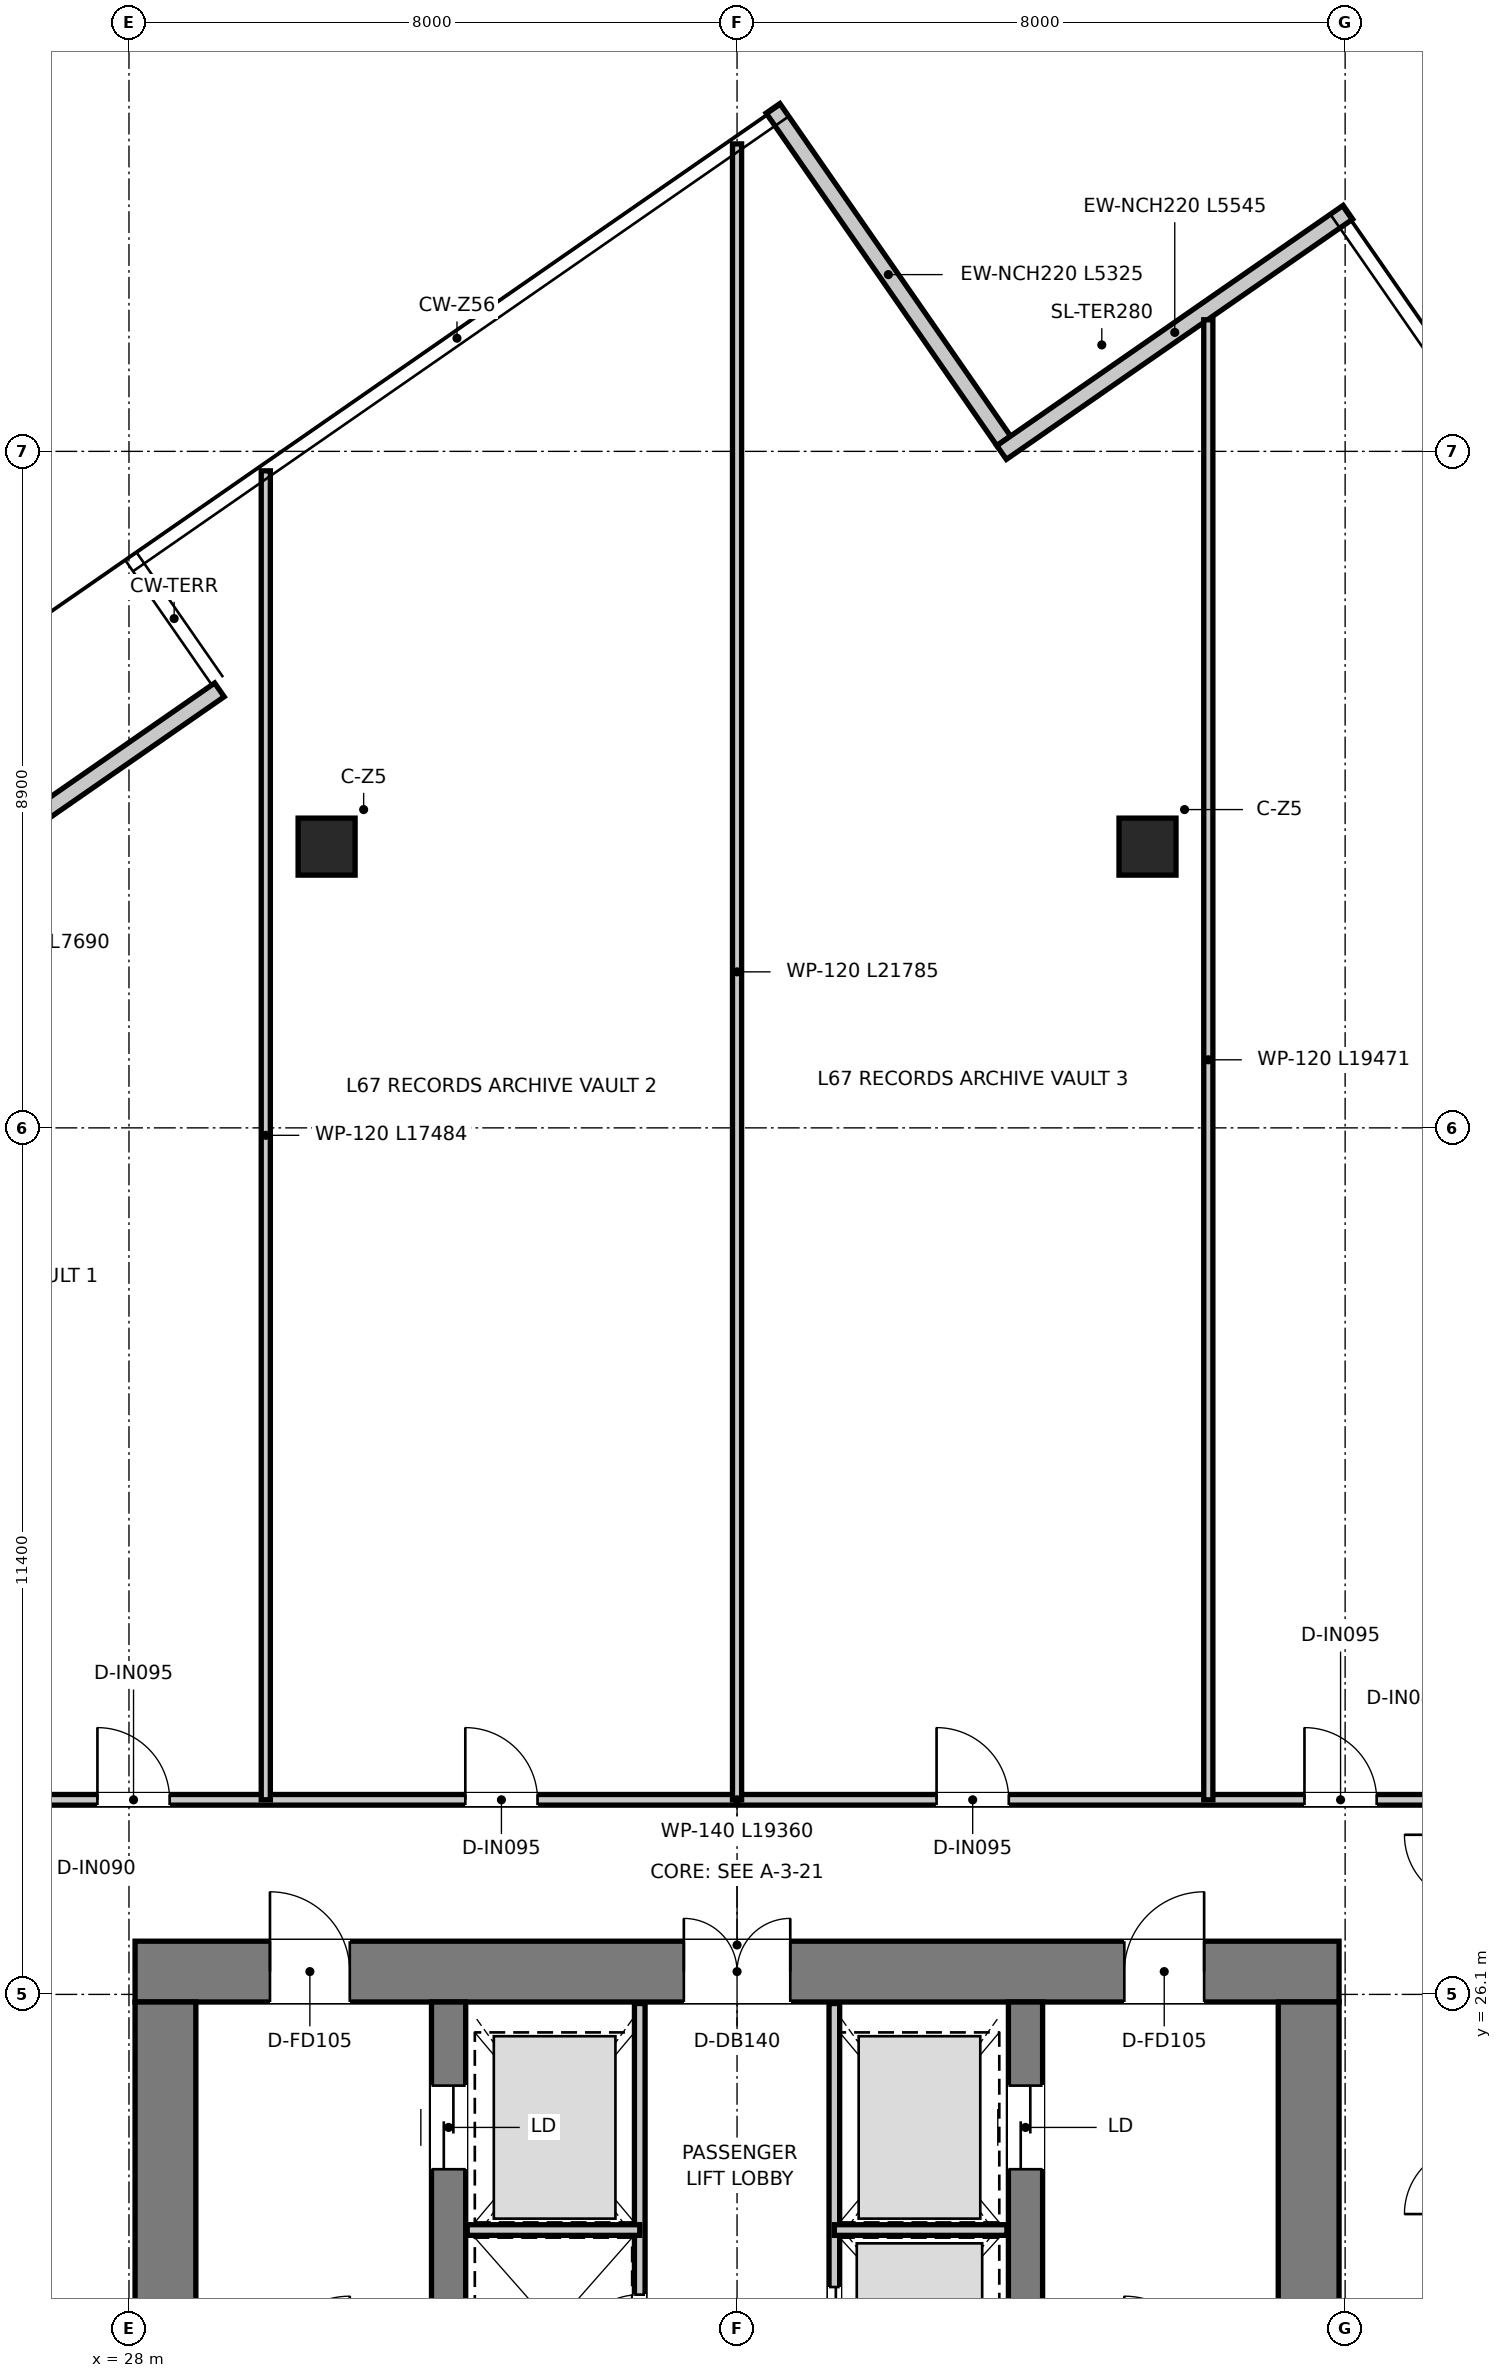
"""IFC4 building model, lengths in metres.
Left out: names, types, materials, properties, quantities, classifications, styles, units other than length and angle.
Written with IfcOpenShell. Run it as: python <this file> out.ifc"""

import sys

from ifc_helpers import new_model, si_unit, direction, frame, frame_2d, origin, origin_2d, place, context, subcontext, project, spatial, rectangle, extrude, source, transform, mapped, element, fill, save


model = new_model("IFC4")
c1 = context("Model", 3, precision=1e-05, world=origin(), true_north=direction((0.0, 1.0)))
c2 = subcontext(c1, "Body", "Model", "MODEL_VIEW")
j1 = project(units=[si_unit("LENGTHUNIT", "METRE"), si_unit("PLANEANGLEUNIT", "RADIAN")], contexts=[c1])
p1 = place(None, origin())
s1 = spatial("IfcSite", under=j1, at=p1, CompositionType="ELEMENT")
p2 = place(p1, origin())
s2 = spatial("IfcBuilding", under=s1, at=p2, CompositionType="ELEMENT")
p3 = place(p2, frame((0.0, 0.0, 275.3)))
s3 = spatial("IfcBuildingStorey", under=s2, at=p3, CompositionType="ELEMENT", Elevation=275.3)
p4 = place(p3, frame((28.08, 26.4, 0.0), z_axis=(0.0, 0.0, 1.0), x_axis=(1.0, 0.0, 0.0)))
e1 = element("IfcWall", 1, at=p4, inside=s3, PredefinedType="SHEAR", context=c2, shape_type="SweptSolid", body=[
    extrude(rectangle(XDim=15.84, YDim=0.8, at=frame_2d((7.92, 0.0))), origin(), (0.0, 0.0, 1.0), 3.95),
])
p5 = place(p4, frame((7.22, 0.0, 0.0)))
e2 = element("IfcOpeningElement", 2, at=p5, cuts=e1, PredefinedType="OPENING", context=c2, shape_type="SweptSolid", body=[
    extrude(rectangle(XDim=1.4, YDim=2.2, at=frame_2d((0.7, 1.1))), frame((0.0, 0.41, 0.0), z_axis=(0.0, -1.0, 0.0), x_axis=(1.0, 0.0, 0.0)), (0.0, 0.0, 1.0), 0.82),
])
p6 = place(p4, frame((1.775, 0.0, 0.0)))
e3 = element("IfcOpeningElement", 3, at=p6, cuts=e1, PredefinedType="OPENING", context=c2, shape_type="SweptSolid", body=[
    extrude(rectangle(XDim=1.05, YDim=2.1, at=frame_2d((0.525, 1.05))), frame((0.0, 0.41, 0.0), z_axis=(0.0, -1.0, 0.0), x_axis=(1.0, 0.0, 0.0)), (0.0, 0.0, 1.0), 0.82),
])
p7 = place(p4, frame((13.015, 0.0, 0.0)))
e4 = element("IfcOpeningElement", 4, at=p7, cuts=e1, PredefinedType="OPENING", context=c2, shape_type="SweptSolid", body=[
    extrude(rectangle(XDim=1.05, YDim=2.1, at=frame_2d((0.525, 1.05))), frame((0.0, 0.41, 0.0), z_axis=(0.0, -1.0, 0.0), x_axis=(1.0, 0.0, 0.0)), (0.0, 0.0, 1.0), 0.82),
])
for number, where, z_axis, x_axis in (
    (5, (28.48, 11.3, 0.0), (0.0, 0.0, 1.0), (0.0, 1.0, 0.0)),
    (6, (43.52, 11.3, 0.0), (0.0, 0.0, 1.0), (0.0, 1.0, 0.0)),
):
    element("IfcWall", number, at=place(p3, frame(where, z_axis=z_axis, x_axis=x_axis)), inside=s3, PredefinedType="SHEAR", context=c2, shape_type="SweptSolid", body=[
        extrude(rectangle(XDim=14.7, YDim=0.8, at=frame_2d((7.35, 0.0))), origin(), (0.0, 0.0, 1.0), 3.95),
    ])
p8 = place(p3, frame((32.205, 13.22, 0.0), z_axis=(0.0, 0.0, 1.0), x_axis=(0.0, 1.0, 0.0)))
e7 = element("IfcWall", 7, at=p8, inside=s3, PredefinedType="SHEAR", context=c2, shape_type="SweptSolid", body=[
    extrude(rectangle(XDim=12.78, YDim=0.45, at=frame_2d((6.39, 0.0))), origin(), (0.0, 0.0, 1.0), 3.95),
])
p9 = place(p8, frame((10.58, 0.0, 0.0)))
e8 = element("IfcOpeningElement", 8, at=p9, cuts=e7, PredefinedType="OPENING", context=c2, shape_type="SweptSolid", body=[
    extrude(rectangle(XDim=1.1, YDim=2.15, at=frame_2d((0.55, 1.075))), frame((0.0, 0.235, 0.0), z_axis=(0.0, -1.0, 0.0), x_axis=(1.0, 0.0, 0.0)), (0.0, 0.0, 1.0), 0.47),
])
p10 = place(p3, frame((39.795, 13.22, 0.0), z_axis=(0.0, 0.0, 1.0), x_axis=(0.0, 1.0, 0.0)))
e9 = element("IfcWall", 9, at=p10, inside=s3, PredefinedType="SHEAR", context=c2, shape_type="SweptSolid", body=[
    extrude(rectangle(XDim=12.78, YDim=0.45, at=frame_2d((6.39, 0.0))), origin(), (0.0, 0.0, 1.0), 3.95),
])
p11 = place(p10, frame((10.58, 0.0, 0.0)))
e10 = element("IfcOpeningElement", 10, at=p11, cuts=e9, PredefinedType="OPENING", context=c2, shape_type="SweptSolid", body=[
    extrude(rectangle(XDim=1.1, YDim=2.15, at=frame_2d((0.55, 1.075))), frame((0.0, 0.235, 0.0), z_axis=(0.0, -1.0, 0.0), x_axis=(1.0, 0.0, 0.0)), (0.0, 0.0, 1.0), 0.47),
])
m1 = source(origin(), c2, "Body", "SweptSolid", [
    extrude(rectangle(XDim=0.75, YDim=0.75, at=origin_2d()), origin(), (0.0, 0.0, 1.0), 3.95),
])
for number, where, z_axis, x_axis in (
    (11, (30.6, 41.2, 0.0), (0.0, 0.0, 1.0), (1.0, 0.0, 0.0)),
    (12, (41.4, 41.2, 0.0), (0.0, 0.0, 1.0), (1.0, 0.0, 0.0)),
):
    element("IfcColumn", number, at=place(p3, frame(where, z_axis=z_axis, x_axis=x_axis)), inside=s3, PredefinedType="COLUMN", context=c2, shape_type="MappedRepresentation", body=[
        mapped(m1, transform((0.0, 0.0, 0.0), x_axis=(1.0, 0.0, 0.0), y_axis=(0.0, 1.0, 0.0), z_axis=(0.0, 0.0, 1.0), scale=1.0)),
    ])
p12 = place(p3, frame((39.508, 46.538, 0.0), z_axis=(0.0, 0.0, 1.0), x_axis=(-0.570020283612, 0.821630620334, 0.0)))
e13 = element("IfcWall", 13, at=p12, inside=s3, PredefinedType="ELEMENTEDWALL", context=c2, shape_type="SweptSolid", body=[
    extrude(rectangle(XDim=5.325, YDim=0.22, at=frame_2d((2.663, 0.0))), origin(), (0.0, 0.0, 1.0), 3.67),
])
p13 = place(p3, frame((22.872, 38.879, 0.0), z_axis=(0.0, 0.0, 1.0), x_axis=(0.821640913491, 0.570005446709, 0.0)))
e14 = element("IfcWall", 14, at=p13, inside=s3, PredefinedType="ELEMENTEDWALL", context=c2, shape_type="SweptSolid", body=[
    extrude(rectangle(XDim=7.69, YDim=0.22, at=frame_2d((3.845, 0.0))), origin(), (0.0, 0.0, 1.0), 3.67),
])
p14 = place(p13, frame((3.857, 0.0, 0.0)))
e15 = element("IfcOpeningElement", 15, at=p14, cuts=e14, PredefinedType="OPENING", context=c2, shape_type="SweptSolid", body=[
    extrude(rectangle(XDim=0.95, YDim=2.1, at=frame_2d((0.475, 1.05))), frame((0.0, 0.12, 0.0), z_axis=(0.0, -1.0, 0.0), x_axis=(1.0, 0.0, 0.0)), (0.0, 0.0, 1.0), 0.24),
])
p15 = place(p3, frame((44.037, 49.545, 0.0), z_axis=(0.0, 0.0, 1.0), x_axis=(-0.821652918874, -0.569988141022, 0.0)))
e16 = element("IfcWall", 16, at=p15, inside=s3, PredefinedType="ELEMENTEDWALL", context=c2, shape_type="SweptSolid", body=[
    extrude(rectangle(XDim=5.545, YDim=0.22, at=frame_2d((2.772, 0.0))), origin(), (0.0, 0.0, 1.0), 3.67),
])
p16 = place(p3, frame((34.72, 20.2, 0.0), z_axis=(0.0, 0.0, 1.0), x_axis=(0.0, 1.0, 0.0)))
e17 = element("IfcWall", 17, at=p16, inside=s3, PredefinedType="PARTITIONING", context=c2, shape_type="SweptSolid", body=[
    extrude(rectangle(XDim=5.78, YDim=0.14, at=frame_2d((2.89, 0.0))), origin(), (0.0, 0.0, 1.0), 2.82),
])
p17 = place(p16, frame((1.05, 0.0, 0.0)))
e18 = element("IfcOpeningElement", 18, at=p17, cuts=e17, PredefinedType="OPENING", context=c2, shape_type="SweptSolid", body=[
    extrude(rectangle(XDim=0.9, YDim=2.1, at=frame_2d((0.45, 1.05))), frame((0.0, 0.08, 0.0), z_axis=(0.0, -1.0, 0.0), x_axis=(1.0, 0.0, 0.0)), (0.0, 0.0, 1.0), 0.16),
])
p18 = place(p3, frame((37.28, 20.2, 0.0), z_axis=(0.0, 0.0, 1.0), x_axis=(0.0, 1.0, 0.0)))
e19 = element("IfcWall", 19, at=p18, inside=s3, PredefinedType="PARTITIONING", context=c2, shape_type="SweptSolid", body=[
    extrude(rectangle(XDim=5.78, YDim=0.14, at=frame_2d((2.89, 0.0))), origin(), (0.0, 0.0, 1.0), 2.82),
])
p19 = place(p18, frame((0.95, 0.0, 0.0)))
e20 = element("IfcOpeningElement", 20, at=p19, cuts=e19, PredefinedType="OPENING", context=c2, shape_type="SweptSolid", body=[
    extrude(rectangle(XDim=1.1, YDim=2.15, at=frame_2d((0.55, 1.075))), frame((0.0, 0.08, 0.0), z_axis=(0.0, -1.0, 0.0), x_axis=(1.0, 0.0, 0.0)), (0.0, 0.0, 1.0), 0.16),
])
for number, where, z_axis, x_axis in (
    (21, (32.45, 23.0, 0.0), (0.0, 0.0, 1.0), (1.0, 0.0, 0.0)),
    (22, (37.28, 23.0, 0.0), (0.0, 0.0, 1.0), (1.0, 0.0, 0.0)),
):
    element("IfcWall", number, at=place(p3, frame(where, z_axis=z_axis, x_axis=x_axis)), inside=s3, PredefinedType="PARTITIONING", context=c2, shape_type="SweptSolid", body=[
        extrude(rectangle(XDim=2.27, YDim=0.14, at=frame_2d((1.135, 0.0))), origin(), (0.0, 0.0, 1.0), 2.82),
    ])
p20 = place(p3, frame((26.32, 28.66, 0.0), z_axis=(0.0, 0.0, 1.0), x_axis=(1.0, 0.0, 0.0)))
e23 = element("IfcWall", 23, at=p20, inside=s3, PredefinedType="PARTITIONING", context=c2, shape_type="SweptSolid", body=[
    extrude(rectangle(XDim=19.36, YDim=0.14, at=frame_2d((9.68, 0.0))), origin(), (0.0, 0.0, 1.0), 3.18),
])
p21 = place(p20, frame((1.265, 0.0, 0.0)))
e24 = element("IfcOpeningElement", 24, at=p21, cuts=e23, PredefinedType="OPENING", context=c2, shape_type="SweptSolid", body=[
    extrude(rectangle(XDim=0.95, YDim=2.1, at=frame_2d((0.475, 1.05))), frame((0.0, 0.08, 0.0), z_axis=(0.0, -1.0, 0.0), x_axis=(1.0, 0.0, 0.0)), (0.0, 0.0, 1.0), 0.16),
])
p22 = place(p20, frame((6.105, 0.0, 0.0)))
e25 = element("IfcOpeningElement", 25, at=p22, cuts=e23, PredefinedType="OPENING", context=c2, shape_type="SweptSolid", body=[
    extrude(rectangle(XDim=0.95, YDim=2.1, at=frame_2d((0.475, 1.05))), frame((0.0, 0.08, 0.0), z_axis=(0.0, -1.0, 0.0), x_axis=(1.0, 0.0, 0.0)), (0.0, 0.0, 1.0), 0.16),
])
p23 = place(p20, frame((12.305, 0.0, 0.0)))
e26 = element("IfcOpeningElement", 26, at=p23, cuts=e23, PredefinedType="OPENING", context=c2, shape_type="SweptSolid", body=[
    extrude(rectangle(XDim=0.95, YDim=2.1, at=frame_2d((0.475, 1.05))), frame((0.0, 0.08, 0.0), z_axis=(0.0, -1.0, 0.0), x_axis=(1.0, 0.0, 0.0)), (0.0, 0.0, 1.0), 0.16),
])
p24 = place(p20, frame((17.145, 0.0, 0.0)))
e27 = element("IfcOpeningElement", 27, at=p24, cuts=e23, PredefinedType="OPENING", context=c2, shape_type="SweptSolid", body=[
    extrude(rectangle(XDim=0.95, YDim=2.1, at=frame_2d((0.475, 1.05))), frame((0.0, 0.08, 0.0), z_axis=(0.0, -1.0, 0.0), x_axis=(1.0, 0.0, 0.0)), (0.0, 0.0, 1.0), 0.16),
])
p25 = place(p3, frame((29.8, 28.66, 0.0), z_axis=(0.0, 0.0, 1.0), x_axis=(0.0, 1.0, 0.0)))
e28 = element("IfcWall", 28, at=p25, inside=s3, PredefinedType="PARTITIONING", context=c2, shape_type="SweptSolid", body=[
    extrude(rectangle(XDim=17.484, YDim=0.12, at=frame_2d((8.742, 0.0))), origin(), (0.0, 0.0, 1.0), 3.13),
])
p26 = place(p3, frame((36.0, 28.66, 0.0), z_axis=(0.0, 0.0, 1.0), x_axis=(0.0, 1.0, 0.0)))
e29 = element("IfcWall", 29, at=p26, inside=s3, PredefinedType="PARTITIONING", context=c2, shape_type="SweptSolid", body=[
    extrude(rectangle(XDim=21.785, YDim=0.12, at=frame_2d((10.893, 0.0))), origin(), (0.0, 0.0, 1.0), 3.13),
])
p27 = place(p3, frame((42.2, 28.66, 0.0), z_axis=(0.0, 0.0, 1.0), x_axis=(0.0, 1.0, 0.0)))
e30 = element("IfcWall", 30, at=p27, inside=s3, PredefinedType="PARTITIONING", context=c2, shape_type="SweptSolid", body=[
    extrude(rectangle(XDim=19.471, YDim=0.12, at=frame_2d((9.736, 0.0))), origin(), (0.0, 0.0, 1.0), 3.13),
])
p28 = place(p5, origin())
e31 = element("IfcDoor", 31, at=p28, inside=s3, OperationType="DOUBLE_DOOR_SINGLE_SWING", PredefinedType="DOOR", context=c2, shape_type="SweptSolid", body=[
    extrude(rectangle(XDim=1.4, YDim=2.2, at=frame_2d((0.7, 1.1))), frame((0.0, 0.025, 0.0), z_axis=(0.0, -1.0, 0.0), x_axis=(1.0, 0.0, 0.0)), (0.0, 0.0, 1.0), 0.05),
])
fill(e2, e31)
p29 = place(p6, origin())
e32 = element("IfcDoor", 32, at=p29, inside=s3, OperationType="SINGLE_SWING_LEFT", PredefinedType="DOOR", context=c2, shape_type="SweptSolid", body=[
    extrude(rectangle(XDim=1.05, YDim=2.1, at=frame_2d((0.525, 1.05))), frame((0.0, 0.025, 0.0), z_axis=(0.0, -1.0, 0.0), x_axis=(1.0, 0.0, 0.0)), (0.0, 0.0, 1.0), 0.05),
])
fill(e3, e32)
p30 = place(p7, origin())
e33 = element("IfcDoor", 33, at=p30, inside=s3, OperationType="SINGLE_SWING_RIGHT", PredefinedType="DOOR", context=c2, shape_type="SweptSolid", body=[
    extrude(rectangle(XDim=1.05, YDim=2.1, at=frame_2d((0.525, 1.05))), frame((0.0, 0.025, 0.0), z_axis=(0.0, -1.0, 0.0), x_axis=(1.0, 0.0, 0.0)), (0.0, 0.0, 1.0), 0.05),
])
fill(e4, e33)
p31 = place(p9, origin())
e34 = element("IfcDoor", 34, at=p31, inside=s3, OperationType="DOUBLE_DOOR_SLIDING", PredefinedType="DOOR", context=c2, shape_type="SweptSolid", body=[
    extrude(rectangle(XDim=1.1, YDim=2.15, at=frame_2d((0.55, 1.075))), frame((0.0, 0.025, 0.0), z_axis=(0.0, -1.0, 0.0), x_axis=(1.0, 0.0, 0.0)), (0.0, 0.0, 1.0), 0.05),
])
fill(e8, e34)
p32 = place(p11, origin())
e35 = element("IfcDoor", 35, at=p32, inside=s3, OperationType="DOUBLE_DOOR_SLIDING", PredefinedType="DOOR", context=c2, shape_type="SweptSolid", body=[
    extrude(rectangle(XDim=1.1, YDim=2.15, at=frame_2d((0.55, 1.075))), frame((0.0, 0.025, 0.0), z_axis=(0.0, -1.0, 0.0), x_axis=(1.0, 0.0, 0.0)), (0.0, 0.0, 1.0), 0.05),
])
fill(e10, e35)
p33 = place(p17, origin())
e36 = element("IfcDoor", 36, at=p33, inside=s3, OperationType="SINGLE_SWING_LEFT", PredefinedType="DOOR", context=c2, shape_type="SweptSolid", body=[
    extrude(rectangle(XDim=0.9, YDim=2.1, at=frame_2d((0.45, 1.05))), frame((0.0, 0.025, 0.0), z_axis=(0.0, -1.0, 0.0), x_axis=(1.0, 0.0, 0.0)), (0.0, 0.0, 1.0), 0.05),
])
fill(e18, e36)
p34 = place(p19, origin())
e37 = element("IfcDoor", 37, at=p34, inside=s3, OperationType="DOUBLE_DOOR_SLIDING", PredefinedType="DOOR", context=c2, shape_type="SweptSolid", body=[
    extrude(rectangle(XDim=1.1, YDim=2.15, at=frame_2d((0.55, 1.075))), frame((0.0, 0.025, 0.0), z_axis=(0.0, -1.0, 0.0), x_axis=(1.0, 0.0, 0.0)), (0.0, 0.0, 1.0), 0.05),
])
fill(e20, e37)
p35 = place(p21, origin())
e38 = element("IfcDoor", 38, at=p35, inside=s3, OperationType="SINGLE_SWING_LEFT", PredefinedType="DOOR", context=c2, shape_type="SweptSolid", body=[
    extrude(rectangle(XDim=0.95, YDim=2.1, at=frame_2d((0.475, 1.05))), frame((0.0, 0.025, 0.0), z_axis=(0.0, -1.0, 0.0), x_axis=(1.0, 0.0, 0.0)), (0.0, 0.0, 1.0), 0.05),
])
fill(e24, e38)
p36 = place(p22, origin())
e39 = element("IfcDoor", 39, at=p36, inside=s3, OperationType="SINGLE_SWING_LEFT", PredefinedType="DOOR", context=c2, shape_type="SweptSolid", body=[
    extrude(rectangle(XDim=0.95, YDim=2.1, at=frame_2d((0.475, 1.05))), frame((0.0, 0.025, 0.0), z_axis=(0.0, -1.0, 0.0), x_axis=(1.0, 0.0, 0.0)), (0.0, 0.0, 1.0), 0.05),
])
fill(e25, e39)
p37 = place(p23, origin())
e40 = element("IfcDoor", 40, at=p37, inside=s3, OperationType="SINGLE_SWING_LEFT", PredefinedType="DOOR", context=c2, shape_type="SweptSolid", body=[
    extrude(rectangle(XDim=0.95, YDim=2.1, at=frame_2d((0.475, 1.05))), frame((0.0, 0.025, 0.0), z_axis=(0.0, -1.0, 0.0), x_axis=(1.0, 0.0, 0.0)), (0.0, 0.0, 1.0), 0.05),
])
fill(e26, e40)
p38 = place(p24, origin())
e41 = element("IfcDoor", 41, at=p38, inside=s3, OperationType="SINGLE_SWING_LEFT", PredefinedType="DOOR", context=c2, shape_type="SweptSolid", body=[
    extrude(rectangle(XDim=0.95, YDim=2.1, at=frame_2d((0.475, 1.05))), frame((0.0, 0.025, 0.0), z_axis=(0.0, -1.0, 0.0), x_axis=(1.0, 0.0, 0.0)), (0.0, 0.0, 1.0), 0.05),
])
fill(e27, e41)
save(model, sys.argv[1])
